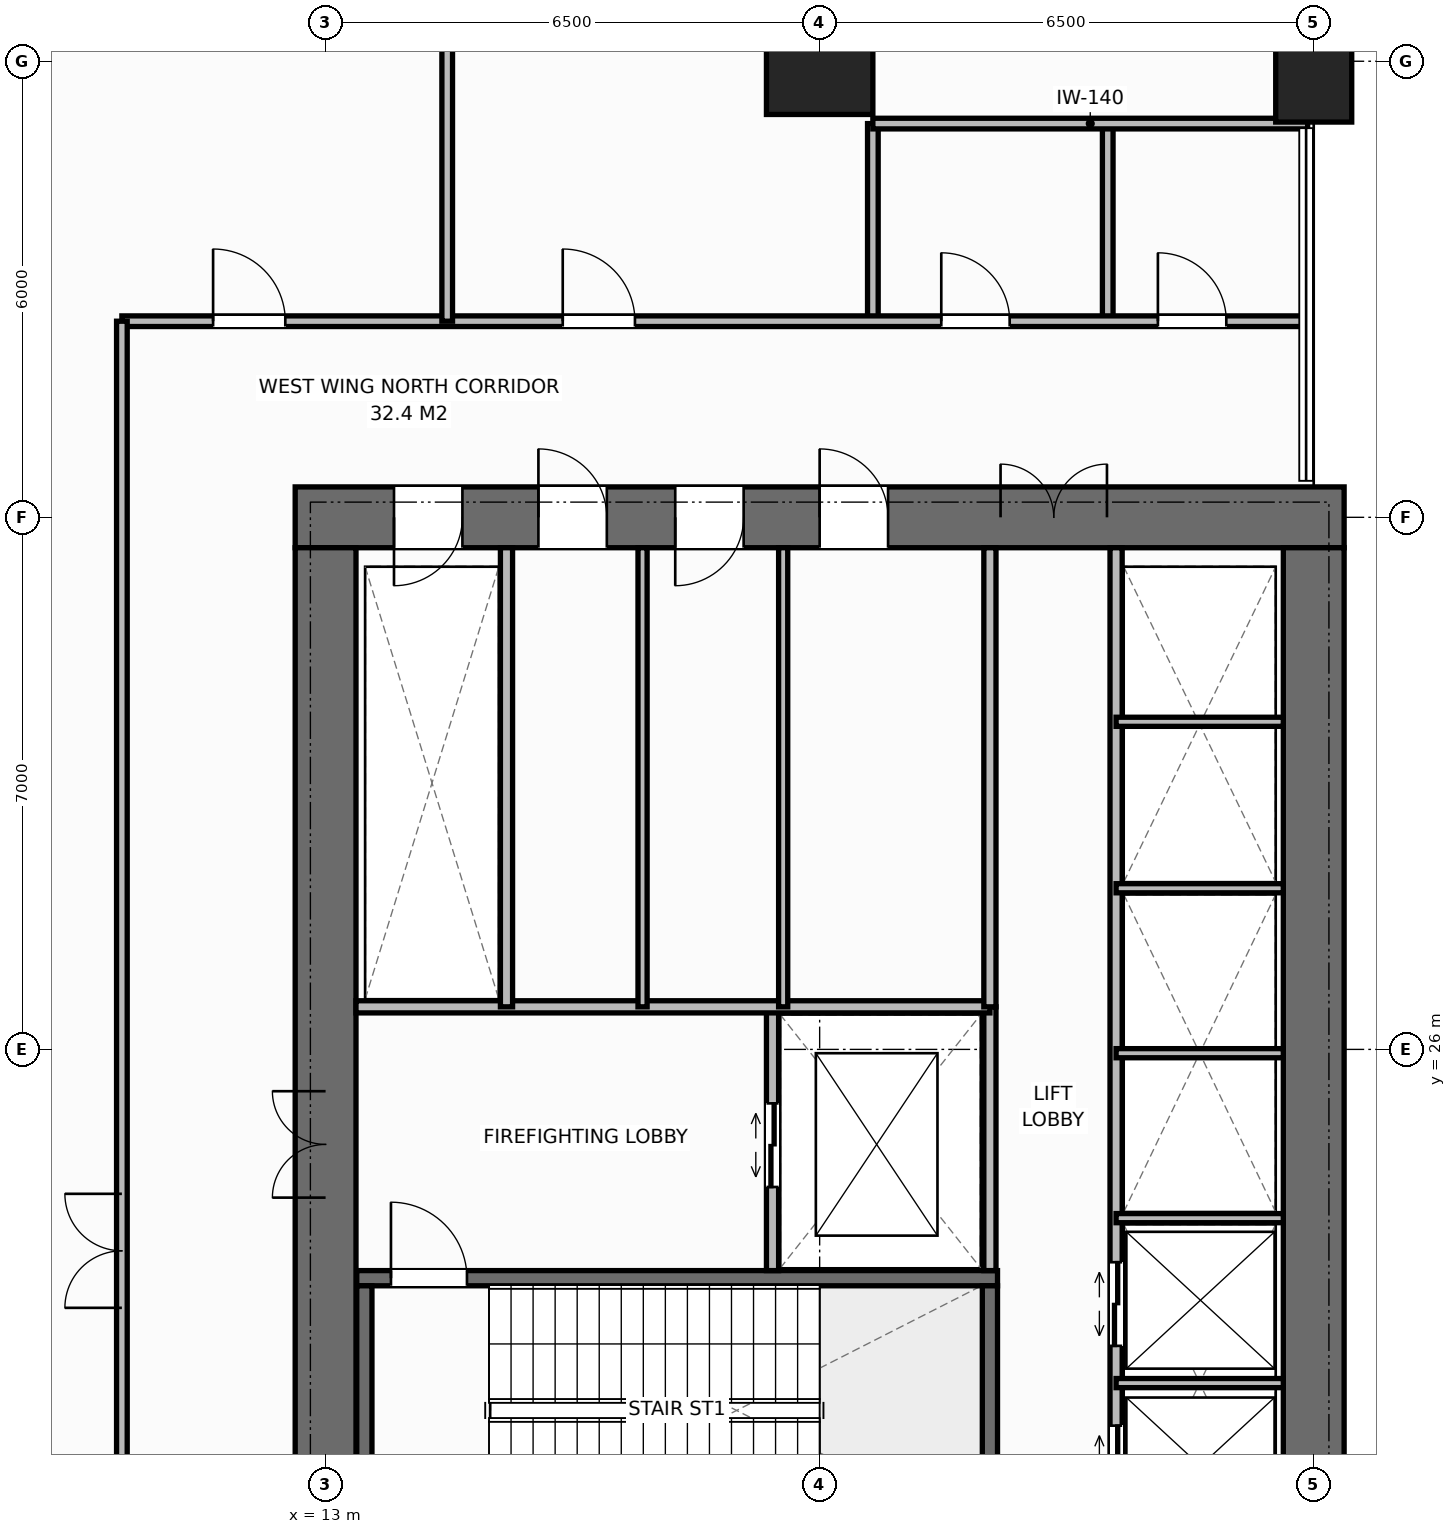
"""IFC4 building model, lengths in metres.
Left out: names, types, materials, properties, quantities, classifications, styles, units other than length and angle.
Written with IfcOpenShell. Run it as: python <this file> out.ifc"""

import sys

from ifc_helpers import new_model, si_unit, direction, frame, frame_2d, origin, origin_2d, place, context, subcontext, project, spatial, rectangle, extrude, element, fill, save


model = new_model("IFC4")
c1 = context("Model", 3, precision=1e-05, world=origin(), true_north=direction((0.0, 1.0)))
c2 = subcontext(c1, "Body", "Model", "MODEL_VIEW")
j1 = project(units=[si_unit("LENGTHUNIT", "METRE"), si_unit("PLANEANGLEUNIT", "RADIAN")], contexts=[c1])
p1 = place(None, origin())
s1 = spatial("IfcSite", under=j1, at=p1, CompositionType="ELEMENT")
p2 = place(p1, origin())
s2 = spatial("IfcBuilding", under=s1, at=p2, CompositionType="ELEMENT")
p3 = place(p2, frame((0.0, 0.0, 11.5)))
s3 = spatial("IfcBuildingStorey", under=s2, at=p3, CompositionType="ELEMENT", Elevation=11.5)
p4 = place(p3, frame((12.6, 33.0, 0.0), z_axis=(0.0, 0.0, 1.0), x_axis=(1.0, 0.0, 0.0)))
e1 = element("IfcWall", 1, at=p4, inside=s3, PredefinedType="SHEAR", context=c2, shape_type="SweptSolid", body=[
    extrude(rectangle(XDim=13.8, YDim=0.8, at=frame_2d((6.9, 0.0))), origin(), (0.0, 0.0, 1.0), 5.5),
])
p5 = place(p4, frame((1.3, 0.0, 0.0)))
e2 = element("IfcOpeningElement", 2, at=p5, cuts=e1, PredefinedType="OPENING", context=c2, shape_type="SweptSolid", body=[
    extrude(rectangle(XDim=0.9, YDim=2.15, at=frame_2d((0.45, 1.075))), frame((0.0, 0.41, 0.0), z_axis=(0.0, -1.0, 0.0), x_axis=(1.0, 0.0, 0.0)), (0.0, 0.0, 1.0), 0.82),
])
p6 = place(p4, frame((3.2, 0.0, 0.0)))
e3 = element("IfcOpeningElement", 3, at=p6, cuts=e1, PredefinedType="OPENING", context=c2, shape_type="SweptSolid", body=[
    extrude(rectangle(XDim=0.9, YDim=2.15, at=frame_2d((0.45, 1.075))), frame((0.0, 0.41, 0.0), z_axis=(0.0, -1.0, 0.0), x_axis=(1.0, 0.0, 0.0)), (0.0, 0.0, 1.0), 0.82),
])
p7 = place(p4, frame((5.0, 0.0, 0.0)))
e4 = element("IfcOpeningElement", 4, at=p7, cuts=e1, PredefinedType="OPENING", context=c2, shape_type="SweptSolid", body=[
    extrude(rectangle(XDim=0.9, YDim=2.15, at=frame_2d((0.45, 1.075))), frame((0.0, 0.41, 0.0), z_axis=(0.0, -1.0, 0.0), x_axis=(1.0, 0.0, 0.0)), (0.0, 0.0, 1.0), 0.82),
])
p8 = place(p4, frame((6.9, 0.0, 0.0)))
e5 = element("IfcOpeningElement", 5, at=p8, cuts=e1, PredefinedType="OPENING", context=c2, shape_type="SweptSolid", body=[
    extrude(rectangle(XDim=0.9, YDim=2.15, at=frame_2d((0.45, 1.075))), frame((0.0, 0.41, 0.0), z_axis=(0.0, -1.0, 0.0), x_axis=(1.0, 0.0, 0.0)), (0.0, 0.0, 1.0), 0.82),
])
p9 = place(p4, frame((9.28, 0.0, 0.0)))
e6 = element("IfcOpeningElement", 6, at=p9, cuts=e1, PredefinedType="OPENING", context=c2, shape_type="SweptSolid", body=[
    extrude(rectangle(XDim=1.4, YDim=2.2, at=frame_2d((0.7, 1.1))), frame((0.0, 0.41, 0.0), z_axis=(0.0, -1.0, 0.0), x_axis=(1.0, 0.0, 0.0)), (0.0, 0.0, 1.0), 0.82),
])
p10 = place(p3, frame((13.0, 19.4, 0.0), z_axis=(0.0, 0.0, 1.0), x_axis=(0.0, 1.0, 0.0)))
e7 = element("IfcWall", 7, at=p10, inside=s3, PredefinedType="SHEAR", context=c2, shape_type="SweptSolid", body=[
    extrude(rectangle(XDim=13.2, YDim=0.8, at=frame_2d((6.6, 0.0))), origin(), (0.0, 0.0, 1.0), 5.5),
])
p11 = place(p10, frame((4.65, 0.0, 0.0)))
e8 = element("IfcOpeningElement", 8, at=p11, cuts=e7, PredefinedType="OPENING", context=c2, shape_type="SweptSolid", body=[
    extrude(rectangle(XDim=1.4, YDim=2.2, at=frame_2d((0.7, 1.1))), frame((0.0, 0.41, 0.0), z_axis=(0.0, -1.0, 0.0), x_axis=(1.0, 0.0, 0.0)), (0.0, 0.0, 1.0), 0.82),
])
p12 = place(p3, frame((26.0, 19.4, 0.0), z_axis=(0.0, 0.0, 1.0), x_axis=(0.0, 1.0, 0.0)))
e9 = element("IfcWall", 9, at=p12, inside=s3, PredefinedType="SHEAR", context=c2, shape_type="SweptSolid", body=[
    extrude(rectangle(XDim=13.2, YDim=0.8, at=frame_2d((6.6, 0.0))), origin(), (0.0, 0.0, 1.0), 5.5),
])
p13 = place(p3, frame((13.41, 22.99, 0.0), z_axis=(0.0, 0.0, 1.0), x_axis=(1.0, 0.0, 0.0)))
e10 = element("IfcWall", 10, at=p13, inside=s3, PredefinedType="SHEAR", context=c2, shape_type="SweptSolid", body=[
    extrude(rectangle(XDim=8.43, YDim=0.2, at=frame_2d((4.215, 0.0))), origin(), (0.0, 0.0, 1.0), 5.5),
])
p14 = place(p13, frame((0.45, 0.0, 0.0)))
e11 = element("IfcOpeningElement", 11, at=p14, cuts=e10, PredefinedType="OPENING", context=c2, shape_type="SweptSolid", body=[
    extrude(rectangle(XDim=1.0, YDim=2.15, at=frame_2d((0.5, 1.075))), frame((0.0, 0.11, 0.0), z_axis=(0.0, -1.0, 0.0), x_axis=(1.0, 0.0, 0.0)), (0.0, 0.0, 1.0), 0.22),
])
for number, where, z_axis, x_axis in (
    (12, (13.51, 19.61, 0.0), (0.0, 0.0, 1.0), (0.0, 1.0, 0.0)),
    (13, (21.74, 19.61, 0.0), (0.0, 0.0, 1.0), (0.0, 1.0, 0.0)),
):
    element("IfcWall", number, at=place(p3, frame(where, z_axis=z_axis, x_axis=x_axis)), inside=s3, PredefinedType="SHEAR", context=c2, shape_type="SweptSolid", body=[
        extrude(rectangle(XDim=3.28, YDim=0.2, at=frame_2d((1.64, 0.0))), origin(), (0.0, 0.0, 1.0), 5.5),
    ])
p15 = place(p3, frame((19.5, 39.0, 0.0), z_axis=(0.0, 0.0, 1.0), x_axis=(1.0, 0.0, 0.0)))
e14 = element("IfcColumn", 14, at=p15, inside=s3, PredefinedType="COLUMN", context=c2, shape_type="SweptSolid", body=[
    extrude(rectangle(XDim=1.4, YDim=1.4, at=origin_2d()), origin(), (0.0, 0.0, 1.0), 5.5),
])
p16 = place(p3, frame((26.0, 39.0, 0.0), z_axis=(0.0, 0.0, 1.0), x_axis=(1.0, 0.0, 0.0)))
e15 = element("IfcColumn", 15, at=p16, inside=s3, PredefinedType="PILASTER", context=c2, shape_type="SweptSolid", body=[
    extrude(rectangle(XDim=1.0, YDim=1.6, at=origin_2d()), origin(), (0.0, 0.0, 1.0), 5.5),
])
p17 = place(p3, frame((21.74, 23.09, 0.0), z_axis=(0.0, 0.0, 1.0), x_axis=(0.0, 1.0, 0.0)))
e16 = element("IfcWall", 16, at=p17, inside=s3, PredefinedType="STANDARD", context=c2, shape_type="SweptSolid", body=[
    extrude(rectangle(XDim=3.47, YDim=0.16, at=frame_2d((1.735, 0.0))), origin(), (0.0, 0.0, 1.0), 5.22),
])
p18 = place(p3, frame((18.88, 23.09, 0.0), z_axis=(0.0, 0.0, 1.0), x_axis=(0.0, 1.0, 0.0)))
e17 = element("IfcWall", 17, at=p18, inside=s3, PredefinedType="STANDARD", context=c2, shape_type="SweptSolid", body=[
    extrude(rectangle(XDim=3.47, YDim=0.16, at=frame_2d((1.735, 0.0))), origin(), (0.0, 0.0, 1.0), 5.22),
])
p19 = place(p18, frame((1.1, 0.0, 0.0)))
e18 = element("IfcOpeningElement", 18, at=p19, cuts=e17, PredefinedType="OPENING", context=c2, shape_type="SweptSolid", body=[
    extrude(rectangle(XDim=1.1, YDim=2.2, at=frame_2d((0.55, 1.1))), frame((0.0, 0.09, 0.0), z_axis=(0.0, -1.0, 0.0), x_axis=(1.0, 0.0, 0.0)), (0.0, 0.0, 1.0), 0.18),
])
p20 = place(p3, frame((13.4, 26.56, 0.0), z_axis=(0.0, 0.0, 1.0), x_axis=(1.0, 0.0, 0.0)))
e19 = element("IfcWall", 19, at=p20, inside=s3, PredefinedType="STANDARD", context=c2, shape_type="SweptSolid", body=[
    extrude(rectangle(XDim=8.34, YDim=0.16, at=frame_2d((4.17, 0.0))), origin(), (0.0, 0.0, 1.0), 5.22),
])
p21 = place(p3, frame((15.38, 26.56, 0.0), z_axis=(0.0, 0.0, 1.0), x_axis=(0.0, 1.0, 0.0)))
e20 = element("IfcWall", 20, at=p21, inside=s3, PredefinedType="STANDARD", context=c2, shape_type="SweptSolid", body=[
    extrude(rectangle(XDim=6.04, YDim=0.16, at=frame_2d((3.02, 0.0))), origin(), (0.0, 0.0, 1.0), 5.22),
])
for number, where, z_axis, x_axis in (
    (21, (17.17, 26.56, 0.0), (0.0, 0.0, 1.0), (0.0, 1.0, 0.0)),
    (22, (19.02, 26.56, 0.0), (0.0, 0.0, 1.0), (0.0, 1.0, 0.0)),
):
    element("IfcWall", number, at=place(p3, frame(where, z_axis=z_axis, x_axis=x_axis)), inside=s3, PredefinedType="PARTITIONING", context=c2, shape_type="SweptSolid", body=[
        extrude(rectangle(XDim=6.04, YDim=0.12, at=frame_2d((3.02, 0.0))), origin(), (0.0, 0.0, 1.0), 5.22),
    ])
p22 = place(p3, frame((21.74, 26.56, 0.0), z_axis=(0.0, 0.0, 1.0), x_axis=(0.0, 1.0, 0.0)))
e23 = element("IfcWall", 23, at=p22, inside=s3, PredefinedType="STANDARD", context=c2, shape_type="SweptSolid", body=[
    extrude(rectangle(XDim=6.04, YDim=0.16, at=frame_2d((3.02, 0.0))), origin(), (0.0, 0.0, 1.0), 5.22),
])
p23 = place(p3, frame((23.4, 19.4, 0.0), z_axis=(0.0, 0.0, 1.0), x_axis=(0.0, 1.0, 0.0)))
e24 = element("IfcWall", 24, at=p23, inside=s3, PredefinedType="STANDARD", context=c2, shape_type="SweptSolid", body=[
    extrude(rectangle(XDim=13.2, YDim=0.16, at=frame_2d((6.6, 0.0))), origin(), (0.0, 0.0, 1.0), 5.22),
])
p24 = place(p23, frame((0.55, 0.0, 0.0)))
e25 = element("IfcOpeningElement", 25, at=p24, cuts=e24, PredefinedType="OPENING", context=c2, shape_type="SweptSolid", body=[
    extrude(rectangle(XDim=1.1, YDim=2.2, at=frame_2d((0.55, 1.1))), frame((0.0, 0.09, 0.0), z_axis=(0.0, -1.0, 0.0), x_axis=(1.0, 0.0, 0.0)), (0.0, 0.0, 1.0), 0.18),
])
p25 = place(p23, frame((2.7, 0.0, 0.0)))
e26 = element("IfcOpeningElement", 26, at=p25, cuts=e24, PredefinedType="OPENING", context=c2, shape_type="SweptSolid", body=[
    extrude(rectangle(XDim=1.1, YDim=2.2, at=frame_2d((0.55, 1.1))), frame((0.0, 0.09, 0.0), z_axis=(0.0, -1.0, 0.0), x_axis=(1.0, 0.0, 0.0)), (0.0, 0.0, 1.0), 0.18),
])
for number, where, z_axis, x_axis in (
    (27, (23.4, 21.61, 0.0), (0.0, 0.0, 1.0), (1.0, 0.0, 0.0)),
    (28, (23.4, 23.78, 0.0), (0.0, 0.0, 1.0), (1.0, 0.0, 0.0)),
    (29, (23.4, 25.95, 0.0), (0.0, 0.0, 1.0), (1.0, 0.0, 0.0)),
    (30, (23.4, 28.12, 0.0), (0.0, 0.0, 1.0), (1.0, 0.0, 0.0)),
    (31, (23.4, 30.31, 0.0), (0.0, 0.0, 1.0), (1.0, 0.0, 0.0)),
):
    element("IfcWall", number, at=place(p3, frame(where, z_axis=z_axis, x_axis=x_axis)), inside=s3, PredefinedType="PARTITIONING", context=c2, shape_type="SweptSolid", body=[
        extrude(rectangle(XDim=2.2, YDim=0.12, at=frame_2d((1.1, 0.0))), origin(), (0.0, 0.0, 1.0), 5.22),
    ])
for number, where, z_axis, x_axis in (
    (32, (20.2, 35.58, 0.0), (0.0, 0.0, 1.0), (0.0, 1.0, 0.0)),
    (33, (23.29, 35.58, 0.0), (0.0, 0.0, 1.0), (0.0, 1.0, 0.0)),
):
    element("IfcWall", number, at=place(p3, frame(where, z_axis=z_axis, x_axis=x_axis)), inside=s3, PredefinedType="PARTITIONING", context=c2, shape_type="SweptSolid", body=[
        extrude(rectangle(XDim=2.6, YDim=0.14, at=frame_2d((1.3, 0.0))), origin(), (0.0, 0.0, 1.0), 5.22),
    ])
p26 = place(p3, frame((20.2, 38.18, 0.0), z_axis=(0.0, 0.0, 1.0), x_axis=(1.0, 0.0, 0.0)))
e34 = element("IfcWall", 34, at=p26, inside=s3, PredefinedType="PARTITIONING", context=c2, shape_type="SweptSolid", body=[
    extrude(rectangle(XDim=5.72, YDim=0.14, at=frame_2d((2.86, 0.0))), origin(), (0.0, 0.0, 1.0), 5.22),
])
p27 = place(p3, frame((10.32, 35.58, 0.0), z_axis=(0.0, 0.0, 1.0), x_axis=(1.0, 0.0, 0.0)))
e35 = element("IfcWall", 35, at=p27, inside=s3, PredefinedType="PARTITIONING", context=c2, shape_type="SweptSolid", body=[
    extrude(rectangle(XDim=15.6, YDim=0.14, at=frame_2d((7.8, 0.0))), origin(), (0.0, 0.0, 1.0), 5.22),
])
p28 = place(p27, frame((10.78, 0.0, 0.0)))
e36 = element("IfcOpeningElement", 36, at=p28, cuts=e35, PredefinedType="OPENING", context=c2, shape_type="SweptSolid", body=[
    extrude(rectangle(XDim=0.9, YDim=2.15, at=frame_2d((0.45, 1.075))), frame((0.0, 0.08, 0.0), z_axis=(0.0, -1.0, 0.0), x_axis=(1.0, 0.0, 0.0)), (0.0, 0.0, 1.0), 0.16),
])
p29 = place(p27, frame((13.63, 0.0, 0.0)))
e37 = element("IfcOpeningElement", 37, at=p29, cuts=e35, PredefinedType="OPENING", context=c2, shape_type="SweptSolid", body=[
    extrude(rectangle(XDim=0.9, YDim=2.15, at=frame_2d((0.45, 1.075))), frame((0.0, 0.08, 0.0), z_axis=(0.0, -1.0, 0.0), x_axis=(1.0, 0.0, 0.0)), (0.0, 0.0, 1.0), 0.16),
])
p30 = place(p27, frame((1.2, 0.0, 0.0)))
e38 = element("IfcOpeningElement", 38, at=p30, cuts=e35, PredefinedType="OPENING", context=c2, shape_type="SweptSolid", body=[
    extrude(rectangle(XDim=0.95, YDim=2.15, at=frame_2d((0.475, 1.075))), frame((0.0, 0.08, 0.0), z_axis=(0.0, -1.0, 0.0), x_axis=(1.0, 0.0, 0.0)), (0.0, 0.0, 1.0), 0.16),
])
p31 = place(p27, frame((5.8, 0.0, 0.0)))
e39 = element("IfcOpeningElement", 39, at=p31, cuts=e35, PredefinedType="OPENING", context=c2, shape_type="SweptSolid", body=[
    extrude(rectangle(XDim=0.95, YDim=2.15, at=frame_2d((0.475, 1.075))), frame((0.0, 0.08, 0.0), z_axis=(0.0, -1.0, 0.0), x_axis=(1.0, 0.0, 0.0)), (0.0, 0.0, 1.0), 0.16),
])
p32 = place(p3, frame((14.6, 35.58, 0.0), z_axis=(0.0, 0.0, 1.0), x_axis=(0.0, 1.0, 0.0)))
e40 = element("IfcWall", 40, at=p32, inside=s3, PredefinedType="PARTITIONING", context=c2, shape_type="SweptSolid", body=[
    extrude(rectangle(XDim=16.36, YDim=0.14, at=frame_2d((8.18, 0.0))), origin(), (0.0, 0.0, 1.0), 5.22),
])
p33 = place(p3, frame((10.32, 18.6, 0.0), z_axis=(0.0, 0.0, 1.0), x_axis=(0.0, 1.0, 0.0)))
e41 = element("IfcWall", 41, at=p33, inside=s3, PredefinedType="PARTITIONING", context=c2, shape_type="SweptSolid", body=[
    extrude(rectangle(XDim=16.98, YDim=0.14, at=frame_2d((8.49, 0.0))), origin(), (0.0, 0.0, 1.0), 5.22),
])
p34 = place(p33, frame((4.0, 0.0, 0.0)))
e42 = element("IfcOpeningElement", 42, at=p34, cuts=e41, PredefinedType="OPENING", context=c2, shape_type="SweptSolid", body=[
    extrude(rectangle(XDim=1.5, YDim=2.2, at=frame_2d((0.75, 1.1))), frame((0.0, 0.08, 0.0), z_axis=(0.0, -1.0, 0.0), x_axis=(1.0, 0.0, 0.0)), (0.0, 0.0, 1.0), 0.16),
])
p35 = place(p14, origin())
e43 = element("IfcDoor", 43, at=p35, inside=s3, OperationType="SINGLE_SWING_LEFT", PredefinedType="DOOR", context=c2, shape_type="SweptSolid", body=[
    extrude(rectangle(XDim=1.0, YDim=2.15, at=frame_2d((0.5, 1.075))), frame((0.0, 0.025, 0.0), z_axis=(0.0, -1.0, 0.0), x_axis=(1.0, 0.0, 0.0)), (0.0, 0.0, 1.0), 0.05),
])
fill(e11, e43)
p36 = place(p11, origin())
e44 = element("IfcDoor", 44, at=p36, inside=s3, OperationType="DOUBLE_DOOR_SINGLE_SWING", PredefinedType="DOOR", context=c2, shape_type="SweptSolid", body=[
    extrude(rectangle(XDim=1.4, YDim=2.2, at=frame_2d((0.7, 1.1))), frame((0.0, 0.025, 0.0), z_axis=(0.0, -1.0, 0.0), x_axis=(1.0, 0.0, 0.0)), (0.0, 0.0, 1.0), 0.05),
])
fill(e8, e44)
p37 = place(p19, origin())
e45 = element("IfcDoor", 45, at=p37, inside=s3, OperationType="DOUBLE_DOOR_SLIDING", PredefinedType="DOOR", context=c2, shape_type="SweptSolid", body=[
    extrude(rectangle(XDim=1.1, YDim=2.2, at=frame_2d((0.55, 1.1))), frame((0.0, 0.025, 0.0), z_axis=(0.0, -1.0, 0.0), x_axis=(1.0, 0.0, 0.0)), (0.0, 0.0, 1.0), 0.05),
])
fill(e18, e45)
p38 = place(p5, origin())
e46 = element("IfcDoor", 46, at=p38, inside=s3, OperationType="SINGLE_SWING_RIGHT", PredefinedType="DOOR", context=c2, shape_type="SweptSolid", body=[
    extrude(rectangle(XDim=0.9, YDim=2.15, at=frame_2d((0.45, 1.075))), frame((0.0, -0.075, 0.0), z_axis=(0.0, -1.0, 0.0), x_axis=(1.0, 0.0, 0.0)), (0.0, 0.0, 1.0), 0.05),
])
fill(e2, e46)
p39 = place(p6, origin())
e47 = element("IfcDoor", 47, at=p39, inside=s3, OperationType="SINGLE_SWING_LEFT", PredefinedType="DOOR", context=c2, shape_type="SweptSolid", body=[
    extrude(rectangle(XDim=0.9, YDim=2.15, at=frame_2d((0.45, 1.075))), frame((0.0, -0.075, 0.0), z_axis=(0.0, -1.0, 0.0), x_axis=(1.0, 0.0, 0.0)), (0.0, 0.0, 1.0), 0.05),
])
fill(e3, e47)
p40 = place(p7, origin())
e48 = element("IfcDoor", 48, at=p40, inside=s3, OperationType="SINGLE_SWING_RIGHT", PredefinedType="DOOR", context=c2, shape_type="SweptSolid", body=[
    extrude(rectangle(XDim=0.9, YDim=2.15, at=frame_2d((0.45, 1.075))), frame((0.0, -0.075, 0.0), z_axis=(0.0, -1.0, 0.0), x_axis=(1.0, 0.0, 0.0)), (0.0, 0.0, 1.0), 0.05),
])
fill(e4, e48)
p41 = place(p8, origin())
e49 = element("IfcDoor", 49, at=p41, inside=s3, OperationType="SINGLE_SWING_LEFT", PredefinedType="DOOR", context=c2, shape_type="SweptSolid", body=[
    extrude(rectangle(XDim=0.9, YDim=2.15, at=frame_2d((0.45, 1.075))), frame((0.0, -0.075, 0.0), z_axis=(0.0, -1.0, 0.0), x_axis=(1.0, 0.0, 0.0)), (0.0, 0.0, 1.0), 0.05),
])
fill(e5, e49)
p42 = place(p9, origin())
e50 = element("IfcDoor", 50, at=p42, inside=s3, OperationType="DOUBLE_DOOR_SINGLE_SWING", PredefinedType="DOOR", context=c2, shape_type="SweptSolid", body=[
    extrude(rectangle(XDim=1.4, YDim=2.2, at=frame_2d((0.7, 1.1))), frame((0.0, -0.075, 0.0), z_axis=(0.0, -1.0, 0.0), x_axis=(1.0, 0.0, 0.0)), (0.0, 0.0, 1.0), 0.05),
])
fill(e6, e50)
p43 = place(p24, origin())
e51 = element("IfcDoor", 51, at=p43, inside=s3, OperationType="DOUBLE_DOOR_SLIDING", PredefinedType="DOOR", context=c2, shape_type="SweptSolid", body=[
    extrude(rectangle(XDim=1.1, YDim=2.2, at=frame_2d((0.55, 1.1))), frame((0.0, 0.025, 0.0), z_axis=(0.0, -1.0, 0.0), x_axis=(1.0, 0.0, 0.0)), (0.0, 0.0, 1.0), 0.05),
])
fill(e25, e51)
p44 = place(p25, origin())
e52 = element("IfcDoor", 52, at=p44, inside=s3, OperationType="DOUBLE_DOOR_SLIDING", PredefinedType="DOOR", context=c2, shape_type="SweptSolid", body=[
    extrude(rectangle(XDim=1.1, YDim=2.2, at=frame_2d((0.55, 1.1))), frame((0.0, 0.025, 0.0), z_axis=(0.0, -1.0, 0.0), x_axis=(1.0, 0.0, 0.0)), (0.0, 0.0, 1.0), 0.05),
])
fill(e26, e52)
p45 = place(p28, origin())
e53 = element("IfcDoor", 53, at=p45, inside=s3, OperationType="SINGLE_SWING_LEFT", PredefinedType="DOOR", context=c2, shape_type="SweptSolid", body=[
    extrude(rectangle(XDim=0.9, YDim=2.15, at=frame_2d((0.45, 1.075))), frame((0.0, 0.025, 0.0), z_axis=(0.0, -1.0, 0.0), x_axis=(1.0, 0.0, 0.0)), (0.0, 0.0, 1.0), 0.05),
])
fill(e36, e53)
p46 = place(p29, origin())
e54 = element("IfcDoor", 54, at=p46, inside=s3, OperationType="SINGLE_SWING_LEFT", PredefinedType="DOOR", context=c2, shape_type="SweptSolid", body=[
    extrude(rectangle(XDim=0.9, YDim=2.15, at=frame_2d((0.45, 1.075))), frame((0.0, 0.025, 0.0), z_axis=(0.0, -1.0, 0.0), x_axis=(1.0, 0.0, 0.0)), (0.0, 0.0, 1.0), 0.05),
])
fill(e37, e54)
p47 = place(p30, origin())
e55 = element("IfcDoor", 55, at=p47, inside=s3, OperationType="SINGLE_SWING_LEFT", PredefinedType="DOOR", context=c2, shape_type="SweptSolid", body=[
    extrude(rectangle(XDim=0.95, YDim=2.15, at=frame_2d((0.475, 1.075))), frame((0.0, 0.025, 0.0), z_axis=(0.0, -1.0, 0.0), x_axis=(1.0, 0.0, 0.0)), (0.0, 0.0, 1.0), 0.05),
])
fill(e38, e55)
p48 = place(p31, origin())
e56 = element("IfcDoor", 56, at=p48, inside=s3, OperationType="SINGLE_SWING_LEFT", PredefinedType="DOOR", context=c2, shape_type="SweptSolid", body=[
    extrude(rectangle(XDim=0.95, YDim=2.15, at=frame_2d((0.475, 1.075))), frame((0.0, 0.025, 0.0), z_axis=(0.0, -1.0, 0.0), x_axis=(1.0, 0.0, 0.0)), (0.0, 0.0, 1.0), 0.05),
])
fill(e39, e56)
p49 = place(p34, origin())
e57 = element("IfcDoor", 57, at=p49, inside=s3, OperationType="DOUBLE_DOOR_SINGLE_SWING", PredefinedType="DOOR", context=c2, shape_type="SweptSolid", body=[
    extrude(rectangle(XDim=1.5, YDim=2.2, at=frame_2d((0.75, 1.1))), frame((0.0, 0.025, 0.0), z_axis=(0.0, -1.0, 0.0), x_axis=(1.0, 0.0, 0.0)), (0.0, 0.0, 1.0), 0.05),
])
fill(e42, e57)
save(model, sys.argv[1])
